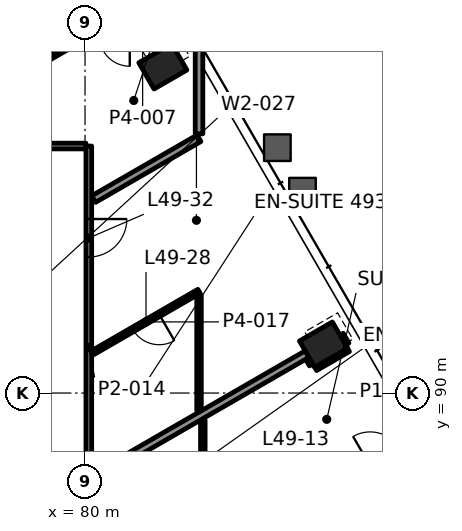
"""IFC4 building model, lengths in metres.
Left out: names, types, materials, properties, quantities, classifications, styles, units other than length and angle.
Written with IfcOpenShell. Run it as: python <this file> out.ifc"""

import sys

from ifc_helpers import new_model, si_unit, direction, frame, frame_2d, origin, origin_2d, place, context, subcontext, project, spatial, rectangle, hollow_rectangle, extrude, element, fill, save


model = new_model("IFC4")
c1 = context("Model", 3, precision=1e-05, world=origin(), true_north=direction((0.0, 1.0)))
c2 = subcontext(c1, "Body", "Model", "MODEL_VIEW")
j1 = project(units=[si_unit("LENGTHUNIT", "METRE"), si_unit("PLANEANGLEUNIT", "RADIAN")], contexts=[c1])
p1 = place(None, origin())
s1 = spatial("IfcSite", under=j1, at=p1, CompositionType="ELEMENT")
p2 = place(p1, origin())
s2 = spatial("IfcBuilding", under=s1, at=p2, CompositionType="ELEMENT")
p3 = place(p2, frame((0.0, 0.0, 210.4)))
s3 = spatial("IfcBuildingStorey", under=s2, at=p3, CompositionType="ELEMENT", Elevation=210.4)
for number, where, z_axis, x_axis in (
    (1, (86.276, 91.274, -0.0), (0.0, 0.0, 1.0), (-0.5, 0.866, 0.0)),
    (2, (82.048, 98.597, -0.0), (0.0, 0.0, 1.0), (-0.5, 0.866, 0.0)),
):
    element("IfcColumn", number, at=place(p3, frame(where, z_axis=z_axis, x_axis=x_axis)), inside=s3, PredefinedType="COLUMN", context=c2, shape_type="SweptSolid", body=[
        extrude(hollow_rectangle(XDim=0.8, YDim=1.0, WallThickness=0.05, at=origin_2d()), origin(), (0.0, 0.0, 1.0), 3.9),
    ])
p4 = place(p3, frame((75.975, 96.5, 0.0), z_axis=(0.0, 0.0, 1.0), x_axis=(1.0, 0.0, 0.0)))
e3 = element("IfcWall", 3, at=p4, inside=s3, PredefinedType="PARTITIONING", context=c2, shape_type="SweptSolid", body=[
    extrude(rectangle(XDim=4.049, YDim=0.15, at=frame_2d((2.025, 0.0))), origin(), (0.0, 0.0, 1.0), 3.1),
])
p5 = place(p3, frame((87.301, 87.96, 0.0), z_axis=(0.0, 0.0, 1.0), x_axis=(0.866000772924, 0.500042659475, 0.0)))
e4 = element("IfcWall", 4, at=p5, inside=s3, PredefinedType="PARTITIONING", context=c2, shape_type="SweptSolid", body=[
    extrude(rectangle(XDim=1.87, YDim=0.1, at=frame_2d((0.935, 0.0))), origin(), (0.0, 0.0, 1.0), 3.022),
])
p6 = place(p5, frame((0.235, 0.0, 0.0)))
e5 = element("IfcOpeningElement", 5, at=p6, cuts=e4, PredefinedType="OPENING", context=c2, shape_type="SweptSolid", body=[
    extrude(rectangle(XDim=0.9, YDim=2.1, at=frame_2d((0.45, 1.05))), frame((0.0, 0.06, 0.0), z_axis=(0.0, -1.0, 0.0), x_axis=(1.0, 0.0, 0.0)), (0.0, 0.0, 1.0), 0.12),
])
p7 = place(p3, frame((86.043, 90.678, 0.0), z_axis=(0.0, 0.0, 1.0), x_axis=(0.866039090965, 0.499976292358, 0.0)))
e6 = element("IfcWall", 6, at=p7, inside=s3, PredefinedType="PARTITIONING", context=c2, shape_type="SweptSolid", body=[
    extrude(rectangle(XDim=0.999, YDim=0.2, at=frame_2d((0.5, 0.0))), origin(), (0.0, 0.0, 1.0), 3.022),
])
p8 = place(p3, frame((80.227, 87.782, 0.0), z_axis=(0.0, 0.0, 1.0), x_axis=(0.866028841934, 0.499994044904, 0.0)))
e7 = element("IfcWall", 7, at=p8, inside=s3, PredefinedType="PARTITIONING", context=c2, shape_type="SweptSolid", body=[
    extrude(rectangle(XDim=6.484, YDim=0.2, at=frame_2d((3.242, 0.0))), origin(), (0.0, 0.0, 1.0), 3.1),
])
p9 = place(p3, frame((83.0, 92.677, 0.0), z_axis=(0.0, 0.0, 1.0), x_axis=(-0.866029130051, -0.499993545862, 0.0)))
e8 = element("IfcWall", 8, at=p9, inside=s3, PredefinedType="PARTITIONING", context=c2, shape_type="SweptSolid", body=[
    extrude(rectangle(XDim=3.222, YDim=0.12, at=frame_2d((1.611, 0.0))), origin(), (0.0, 0.0, 1.0), 3.1),
])
p10 = place(p9, frame((1.211, 0.0, 0.0)))
e9 = element("IfcOpeningElement", 9, at=p10, cuts=e8, PredefinedType="OPENING", context=c2, shape_type="SweptSolid", body=[
    extrude(rectangle(XDim=0.8, YDim=2.1, at=frame_2d((0.4, 1.05))), frame((0.0, 0.07, 0.0), z_axis=(0.0, -1.0, 0.0), x_axis=(1.0, 0.0, 0.0)), (0.0, 0.0, 1.0), 0.14),
])
p11 = place(p3, frame((80.227, 95.104, 0.0), z_axis=(0.0, 0.0, 1.0), x_axis=(0.866029421769, 0.499993040581, 0.0)))
e10 = element("IfcWall", 10, at=p11, inside=s3, PredefinedType="PARTITIONING", context=c2, shape_type="SweptSolid", body=[
    extrude(rectangle(XDim=3.202, YDim=0.2, at=frame_2d((1.601, 0.0))), origin(), (0.0, 0.0, 1.0), 3.022),
])
p12 = place(p3, frame((76.01, 97.063, 0.0), z_axis=(0.0, 0.0, 1.0), x_axis=(0.866045536992, 0.499965126639, 0.0)))
e11 = element("IfcWall", 11, at=p12, inside=s3, PredefinedType="PARTITIONING", context=c2, shape_type="SweptSolid", body=[
    extrude(rectangle(XDim=4.674, YDim=0.12, at=frame_2d((2.337, 0.0))), origin(), (0.0, 0.0, 1.0), 3.1),
])
p13 = place(p3, frame((83.1, 87.96, 0.0), z_axis=(0.0, 0.0, 1.0), x_axis=(0.0, 1.0, 0.0)))
e12 = element("IfcWall", 12, at=p13, inside=s3, PredefinedType="PARTITIONING", context=c2, shape_type="SweptSolid", body=[
    extrude(rectangle(XDim=1.325, YDim=0.12, at=frame_2d((0.663, 0.0))), origin(), (0.0, 0.0, 1.0), 3.1),
])
p14 = place(p3, frame((83.0, 89.538, 0.0), z_axis=(0.0, 0.0, 1.0), x_axis=(0.0, 1.0, 0.0)))
e13 = element("IfcWall", 13, at=p14, inside=s3, PredefinedType="PARTITIONING", context=c2, shape_type="SweptSolid", body=[
    extrude(rectangle(XDim=3.031, YDim=0.12, at=frame_2d((1.515, 0.0))), origin(), (0.0, 0.0, 1.0), 3.1),
])
p15 = place(p3, frame((83.0, 96.821, 0.0), z_axis=(0.0, 0.0, 1.0), x_axis=(0.0, 1.0, 0.0)))
e14 = element("IfcWall", 14, at=p15, inside=s3, PredefinedType="PARTITIONING", context=c2, shape_type="SweptSolid", body=[
    extrude(rectangle(XDim=2.328, YDim=0.2, at=frame_2d((1.164, 0.0))), origin(), (0.0, 0.0, 1.0), 3.022),
])
p16 = place(p3, frame((80.1, 96.5, 0.0), z_axis=(0.0, 0.0, 1.0), x_axis=(0.0, -1.0, 0.0)))
e15 = element("IfcWall", 15, at=p16, inside=s3, PredefinedType="PARTITIONING", context=c2, shape_type="SweptSolid", body=[
    extrude(rectangle(XDim=10.6, YDim=0.15, at=frame_2d((5.3, 0.0))), origin(), (0.0, 0.0, 1.0), 3.097),
])
p17 = place(p16, frame((1.92, 0.0, 0.0)))
e16 = element("IfcOpeningElement", 16, at=p17, cuts=e15, PredefinedType="OPENING", context=c2, shape_type="SweptSolid", body=[
    extrude(rectangle(XDim=1.0, YDim=2.1, at=frame_2d((0.5, 1.05))), frame((0.0, 0.085, 0.0), z_axis=(0.0, -1.0, 0.0), x_axis=(1.0, 0.0, 0.0)), (0.0, 0.0, 1.0), 0.17),
])
p18 = place(p3, frame((86.859, 91.264, 0.0), z_axis=(0.0, 0.0, 1.0), x_axis=(-0.500264001326, 0.865872928886, 0.0)))
e17 = element("IfcWall", 17, at=p18, inside=s3, PredefinedType="PARTITIONING", context=c2, shape_type="SweptSolid", body=[
    extrude(rectangle(XDim=0.299, YDim=0.2, at=frame_2d((0.149, 0.0))), origin(), (0.0, 0.0, 1.0), 3.1),
])
p19 = place(p3, frame((85.993, 90.764, 0.0), z_axis=(0.0, 0.0, 1.0), x_axis=(-0.500359323436, 0.865817848887, 0.0)))
e18 = element("IfcWall", 18, at=p19, inside=s3, PredefinedType="PARTITIONING", context=c2, shape_type="SweptSolid", body=[
    extrude(rectangle(XDim=0.199, YDim=0.2, at=frame_2d((0.1, 0.0))), origin(), (0.0, 0.0, 1.0), 3.1),
])
p20 = place(p6, origin())
e19 = element("IfcDoor", 19, at=p20, inside=s3, OperationType="SINGLE_SWING_LEFT", PredefinedType="DOOR", context=c2, shape_type="SweptSolid", body=[
    extrude(rectangle(XDim=0.9, YDim=2.1, at=frame_2d((0.45, 1.05))), frame((0.0, 0.025, 0.0), z_axis=(0.0, -1.0, 0.0), x_axis=(1.0, 0.0, 0.0)), (0.0, 0.0, 1.0), 0.05),
])
fill(e5, e19)
p21 = place(p10, origin())
e20 = element("IfcDoor", 20, at=p21, inside=s3, OperationType="SINGLE_SWING_LEFT", PredefinedType="DOOR", context=c2, shape_type="SweptSolid", body=[
    extrude(rectangle(XDim=0.8, YDim=2.1, at=frame_2d((0.4, 1.05))), frame((0.0, 0.025, 0.0), z_axis=(0.0, -1.0, 0.0), x_axis=(1.0, 0.0, 0.0)), (0.0, 0.0, 1.0), 0.05),
])
fill(e9, e20)
p22 = place(p17, origin())
e21 = element("IfcDoor", 21, at=p22, inside=s3, OperationType="SINGLE_SWING_RIGHT", PredefinedType="DOOR", context=c2, shape_type="SweptSolid", body=[
    extrude(rectangle(XDim=1.0, YDim=2.1, at=frame_2d((0.5, 1.05))), frame((0.0, 0.025, 0.0), z_axis=(0.0, -1.0, 0.0), x_axis=(1.0, 0.0, 0.0)), (0.0, 0.0, 1.0), 0.05),
])
fill(e16, e21)
save(model, sys.argv[1])
